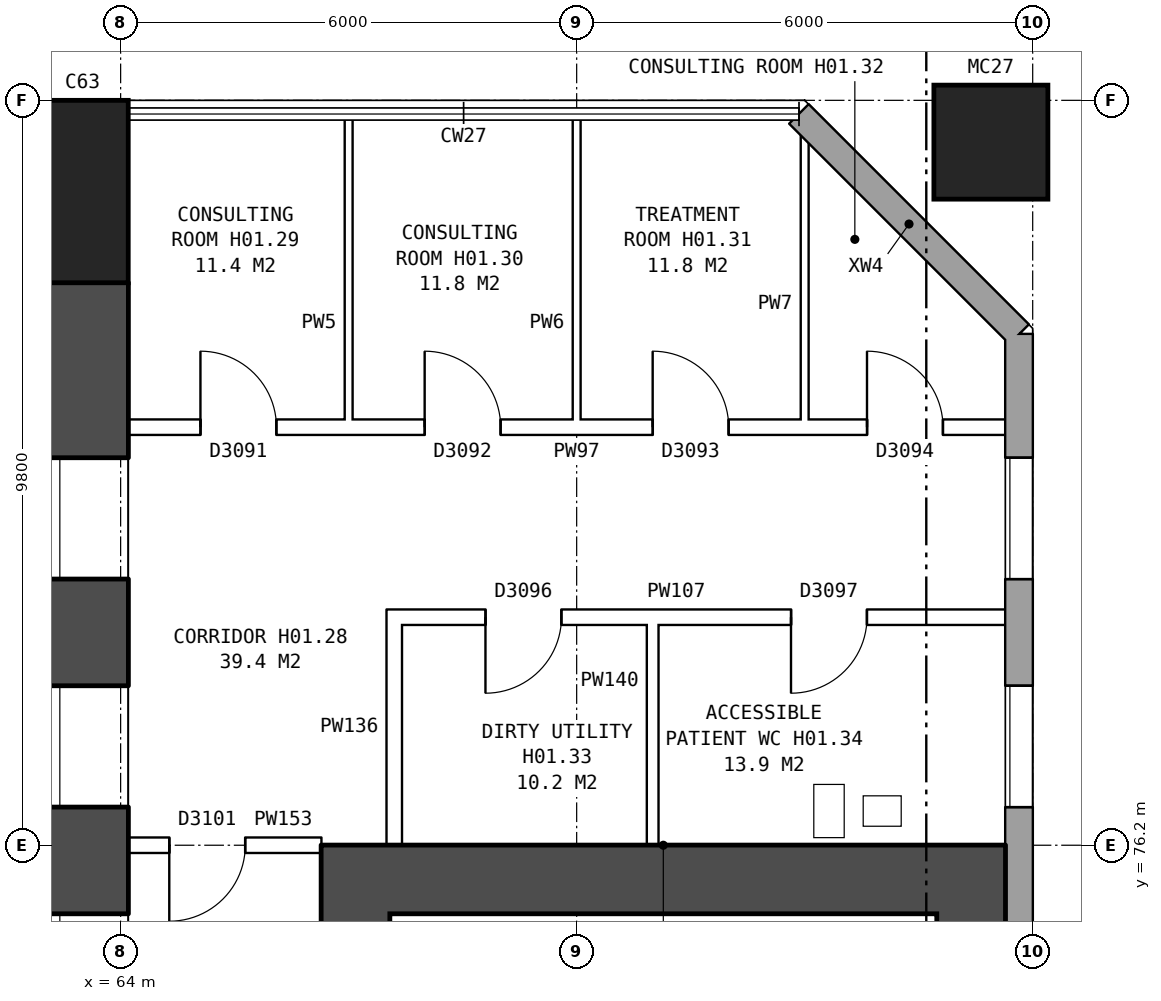
"""IFC4 building model, lengths in metres.
Left out: names, types, materials, properties, quantities, classifications, styles, units other than length and angle.
Written with IfcOpenShell. Run it as: python <this file> out.ifc"""

import sys

from ifc_helpers import new_model, si_unit, direction, frame, frame_2d, origin, origin_2d, place, context, subcontext, project, spatial, rectangle, hollow_rectangle, extrude, element, fill, save


model = new_model("IFC4")
c1 = context("Model", 3, precision=1e-05, world=origin(), true_north=direction((0.0, 1.0)))
c2 = subcontext(c1, "Body", "Model", "MODEL_VIEW")
j1 = project(units=[si_unit("LENGTHUNIT", "METRE"), si_unit("PLANEANGLEUNIT", "RADIAN")], contexts=[c1])
p1 = place(None, origin())
s1 = spatial("IfcSite", under=j1, at=p1, CompositionType="ELEMENT")
p2 = place(p1, origin())
s2 = spatial("IfcBuilding", under=s1, at=p2, CompositionType="ELEMENT")
p3 = place(p2, frame((0.0, 0.0, 5.5)))
s3 = spatial("IfcBuildingStorey", under=s2, at=p3, CompositionType="ELEMENT", Elevation=5.5)
p4 = place(p3, frame((63.5, 84.8, -0.3), z_axis=(0.0, 0.0, 1.0), x_axis=(1.0, 0.0, 0.0)))
e1 = element("IfcColumn", 1, at=p4, inside=s3, PredefinedType="COLUMN", context=c2, shape_type="SweptSolid", body=[
    extrude(rectangle(XDim=1.2, YDim=2.4, at=origin_2d()), origin(), (0.0, 0.0, 1.0), 4.6),
])
p5 = place(p3, frame((63.5, 56.4, -0.3), z_axis=(0.0, 0.0, 1.0), x_axis=(0.0, 1.0, 0.0)))
e2 = element("IfcWall", 2, at=p5, inside=s3, PredefinedType="SHEAR", context=c2, shape_type="SweptSolid", body=[
    extrude(rectangle(XDim=27.2, YDim=1.2, at=frame_2d((13.6, 0.0))), origin(), (0.0, 0.0, 1.0), 4.6),
])
p6 = place(p5, frame((2.3, 0.0, 0.8)))
e3 = element("IfcOpeningElement", 3, at=p6, cuts=e2, PredefinedType="OPENING", context=c2, shape_type="SweptSolid", body=[
    extrude(rectangle(XDim=1.6, YDim=1.8, at=frame_2d((0.8, 0.9))), frame((0.0, 0.61, 0.0), z_axis=(0.0, -1.0, 0.0), x_axis=(1.0, 0.0, 0.0)), (0.0, 0.0, 1.0), 1.22),
])
p7 = place(p5, frame((5.3, 0.0, 0.8)))
e4 = element("IfcOpeningElement", 4, at=p7, cuts=e2, PredefinedType="OPENING", context=c2, shape_type="SweptSolid", body=[
    extrude(rectangle(XDim=1.6, YDim=1.8, at=frame_2d((0.8, 0.9))), frame((0.0, 0.61, 0.0), z_axis=(0.0, -1.0, 0.0), x_axis=(1.0, 0.0, 0.0)), (0.0, 0.0, 1.0), 1.22),
])
p8 = place(p5, frame((8.3, 0.0, 0.8)))
e5 = element("IfcOpeningElement", 5, at=p8, cuts=e2, PredefinedType="OPENING", context=c2, shape_type="SweptSolid", body=[
    extrude(rectangle(XDim=1.6, YDim=1.8, at=frame_2d((0.8, 0.9))), frame((0.0, 0.61, 0.0), z_axis=(0.0, -1.0, 0.0), x_axis=(1.0, 0.0, 0.0)), (0.0, 0.0, 1.0), 1.22),
])
p9 = place(p5, frame((11.3, 0.0, 0.8)))
e6 = element("IfcOpeningElement", 6, at=p9, cuts=e2, PredefinedType="OPENING", context=c2, shape_type="SweptSolid", body=[
    extrude(rectangle(XDim=1.6, YDim=1.8, at=frame_2d((0.8, 0.9))), frame((0.0, 0.61, 0.0), z_axis=(0.0, -1.0, 0.0), x_axis=(1.0, 0.0, 0.0)), (0.0, 0.0, 1.0), 1.22),
])
p10 = place(p5, frame((14.3, 0.0, 0.8)))
e7 = element("IfcOpeningElement", 7, at=p10, cuts=e2, PredefinedType="OPENING", context=c2, shape_type="SweptSolid", body=[
    extrude(rectangle(XDim=1.6, YDim=1.8, at=frame_2d((0.8, 0.9))), frame((0.0, 0.61, 0.0), z_axis=(0.0, -1.0, 0.0), x_axis=(1.0, 0.0, 0.0)), (0.0, 0.0, 1.0), 1.22),
])
p11 = place(p5, frame((17.3, 0.0, 0.8)))
e8 = element("IfcOpeningElement", 8, at=p11, cuts=e2, PredefinedType="OPENING", context=c2, shape_type="SweptSolid", body=[
    extrude(rectangle(XDim=1.6, YDim=1.8, at=frame_2d((0.8, 0.9))), frame((0.0, 0.61, 0.0), z_axis=(0.0, -1.0, 0.0), x_axis=(1.0, 0.0, 0.0)), (0.0, 0.0, 1.0), 1.22),
])
p12 = place(p5, frame((20.3, 0.0, 0.8)))
e9 = element("IfcOpeningElement", 9, at=p12, cuts=e2, PredefinedType="OPENING", context=c2, shape_type="SweptSolid", body=[
    extrude(rectangle(XDim=1.6, YDim=1.8, at=frame_2d((0.8, 0.9))), frame((0.0, 0.61, 0.0), z_axis=(0.0, -1.0, 0.0), x_axis=(1.0, 0.0, 0.0)), (0.0, 0.0, 1.0), 1.22),
])
p13 = place(p5, frame((23.3, 0.0, 0.8)))
e10 = element("IfcOpeningElement", 10, at=p13, cuts=e2, PredefinedType="OPENING", context=c2, shape_type="SweptSolid", body=[
    extrude(rectangle(XDim=1.6, YDim=1.8, at=frame_2d((0.8, 0.9))), frame((0.0, 0.61, 0.0), z_axis=(0.0, -1.0, 0.0), x_axis=(1.0, 0.0, 0.0)), (0.0, 0.0, 1.0), 1.22),
])
p14 = place(p3, frame((75.45, 85.45, 0.0), z_axis=(0.0, 0.0, 1.0), x_axis=(1.0, 0.0, 0.0)))
e11 = element("IfcColumn", 11, at=p14, inside=s3, PredefinedType="COLUMN", context=c2, shape_type="SweptSolid", body=[
    extrude(hollow_rectangle(XDim=1.5, YDim=1.5, WallThickness=0.08, at=origin_2d()), origin(), (0.0, 0.0, 1.0), 4.6),
])
p15 = place(p3, frame((75.82, 57.075, 0.0), z_axis=(0.0, 0.0, 1.0), x_axis=(0.0, 1.0, 0.0)))
e12 = element("IfcWall", 12, at=p15, inside=s3, PredefinedType="STANDARD", context=c2, shape_type="SweptSolid", body=[
    extrude(rectangle(XDim=25.851, YDim=0.36, at=frame_2d((12.925, 0.0))), origin(), (0.0, 0.0, 1.0), 4.3),
])
p16 = place(p15, frame((1.625, 0.0, 0.8)))
e13 = element("IfcOpeningElement", 13, at=p16, cuts=e12, PredefinedType="OPENING", context=c2, shape_type="SweptSolid", body=[
    extrude(rectangle(XDim=1.6, YDim=1.8, at=frame_2d((0.8, 0.9))), frame((0.0, 0.19, 0.0), z_axis=(0.0, -1.0, 0.0), x_axis=(1.0, 0.0, 0.0)), (0.0, 0.0, 1.0), 0.38),
])
p17 = place(p15, frame((4.625, 0.0, 0.8)))
e14 = element("IfcOpeningElement", 14, at=p17, cuts=e12, PredefinedType="OPENING", context=c2, shape_type="SweptSolid", body=[
    extrude(rectangle(XDim=1.6, YDim=1.8, at=frame_2d((0.8, 0.9))), frame((0.0, 0.19, 0.0), z_axis=(0.0, -1.0, 0.0), x_axis=(1.0, 0.0, 0.0)), (0.0, 0.0, 1.0), 0.38),
])
p18 = place(p15, frame((19.625, 0.0, 0.8)))
e15 = element("IfcOpeningElement", 15, at=p18, cuts=e12, PredefinedType="OPENING", context=c2, shape_type="SweptSolid", body=[
    extrude(rectangle(XDim=1.6, YDim=1.8, at=frame_2d((0.8, 0.9))), frame((0.0, 0.19, 0.0), z_axis=(0.0, -1.0, 0.0), x_axis=(1.0, 0.0, 0.0)), (0.0, 0.0, 1.0), 0.38),
])
p19 = place(p15, frame((22.625, 0.0, 0.8)))
e16 = element("IfcOpeningElement", 16, at=p19, cuts=e12, PredefinedType="OPENING", context=c2, shape_type="SweptSolid", body=[
    extrude(rectangle(XDim=1.6, YDim=1.8, at=frame_2d((0.8, 0.9))), frame((0.0, 0.19, 0.0), z_axis=(0.0, -1.0, 0.0), x_axis=(1.0, 0.0, 0.0)), (0.0, 0.0, 1.0), 0.38),
])
p20 = place(p3, frame((75.82, 82.925, 0.0), z_axis=(0.0, 0.0, 1.0), x_axis=(-0.707106781187, 0.707106781187, 0.0)))
e17 = element("IfcWall", 17, at=p20, inside=s3, PredefinedType="STANDARD", context=c2, shape_type="SweptSolid", body=[
    extrude(rectangle(XDim=4.094, YDim=0.36, at=frame_2d((2.047, 0.0))), origin(), (0.0, 0.0, 1.0), 4.3),
])
p21 = place(p3, frame((67.09, 64.7, 0.0), z_axis=(0.0, 0.0, 1.0), x_axis=(0.0, 1.0, 0.0)))
e18 = element("IfcWall", 18, at=p21, inside=s3, PredefinedType="SHEAR", context=c2, shape_type="SweptSolid", body=[
    extrude(rectangle(XDim=10.6, YDim=0.9, at=frame_2d((5.3, 0.0))), origin(), (0.0, 0.0, 1.0), 4.3),
])
p22 = place(p21, frame((0.425, 0.0, 0.0)))
e19 = element("IfcOpeningElement", 19, at=p22, cuts=e18, PredefinedType="OPENING", context=c2, shape_type="SweptSolid", body=[
    extrude(rectangle(XDim=1.1, YDim=2.1, at=frame_2d((0.55, 1.05))), frame((0.0, 0.46, 0.0), z_axis=(0.0, -1.0, 0.0), x_axis=(1.0, 0.0, 0.0)), (0.0, 0.0, 1.0), 0.92),
])
p23 = place(p21, frame((9.0, 0.0, 0.0)))
e20 = element("IfcOpeningElement", 20, at=p23, cuts=e18, PredefinedType="OPENING", context=c2, shape_type="SweptSolid", body=[
    extrude(rectangle(XDim=1.1, YDim=2.1, at=frame_2d((0.55, 1.05))), frame((0.0, 0.46, 0.0), z_axis=(0.0, -1.0, 0.0), x_axis=(1.0, 0.0, 0.0)), (0.0, 0.0, 1.0), 0.92),
])
p24 = place(p3, frame((75.19, 64.7, 0.0), z_axis=(0.0, 0.0, 1.0), x_axis=(0.0, 1.0, 0.0)))
e21 = element("IfcWall", 21, at=p24, inside=s3, PredefinedType="SHEAR", context=c2, shape_type="SweptSolid", body=[
    extrude(rectangle(XDim=10.6, YDim=0.9, at=frame_2d((5.3, 0.0))), origin(), (0.0, 0.0, 1.0), 4.3),
])
p25 = place(p3, frame((66.64, 75.75, 0.0), z_axis=(0.0, 0.0, 1.0), x_axis=(1.0, 0.0, 0.0)))
e22 = element("IfcWall", 22, at=p25, inside=s3, PredefinedType="SHEAR", context=c2, shape_type="SweptSolid", body=[
    extrude(rectangle(XDim=9.0, YDim=0.9, at=frame_2d((4.5, 0.0))), origin(), (0.0, 0.0, 1.0), 4.3),
])
p26 = place(p3, frame((64.1, 76.2, 0.0), z_axis=(0.0, 0.0, 1.0), x_axis=(1.0, 0.0, 0.0)))
e23 = element("IfcWall", 23, at=p26, inside=s3, PredefinedType="PARTITIONING", context=c2, shape_type="SweptSolid", body=[
    extrude(rectangle(XDim=2.54, YDim=0.2, at=frame_2d((1.27, 0.0))), origin(), (0.0, 0.0, 1.0), 4.3),
])
p27 = place(p26, frame((0.54, 0.0, 0.0)))
e24 = element("IfcOpeningElement", 24, at=p27, cuts=e23, PredefinedType="OPENING", context=c2, shape_type="SweptSolid", body=[
    extrude(rectangle(XDim=1.0, YDim=2.1, at=frame_2d((0.5, 1.05))), frame((0.0, 0.11, 0.0), z_axis=(0.0, -1.0, 0.0), x_axis=(1.0, 0.0, 0.0)), (0.0, 0.0, 1.0), 0.22),
])
p28 = place(p3, frame((67.5, 79.2, 0.0), z_axis=(0.0, 0.0, 1.0), x_axis=(1.0, 0.0, 0.0)))
e25 = element("IfcWall", 25, at=p28, inside=s3, PredefinedType="PARTITIONING", context=c2, shape_type="SweptSolid", body=[
    extrude(rectangle(XDim=8.26, YDim=0.2, at=frame_2d((4.13, 0.0))), origin(), (0.0, 0.0, 1.0), 4.3),
])
p29 = place(p28, frame((1.3, 0.0, 0.0)))
e26 = element("IfcOpeningElement", 26, at=p29, cuts=e25, PredefinedType="OPENING", context=c2, shape_type="SweptSolid", body=[
    extrude(rectangle(XDim=1.0, YDim=2.1, at=frame_2d((0.5, 1.05))), frame((0.0, 0.11, 0.0), z_axis=(0.0, -1.0, 0.0), x_axis=(1.0, 0.0, 0.0)), (0.0, 0.0, 1.0), 0.22),
])
p30 = place(p28, frame((5.32, 0.0, 0.0)))
e27 = element("IfcOpeningElement", 27, at=p30, cuts=e25, PredefinedType="OPENING", context=c2, shape_type="SweptSolid", body=[
    extrude(rectangle(XDim=1.0, YDim=2.1, at=frame_2d((0.5, 1.05))), frame((0.0, 0.11, 0.0), z_axis=(0.0, -1.0, 0.0), x_axis=(1.0, 0.0, 0.0)), (0.0, 0.0, 1.0), 0.22),
])
p31 = place(p3, frame((63.98, 81.7, 0.0), z_axis=(0.0, 0.0, 1.0), x_axis=(1.0, 0.0, 0.0)))
e28 = element("IfcWall", 28, at=p31, inside=s3, PredefinedType="PARTITIONING", context=c2, shape_type="SweptSolid", body=[
    extrude(rectangle(XDim=11.78, YDim=0.2, at=frame_2d((5.89, 0.0))), origin(), (0.0, 0.0, 1.0), 4.3),
])
p32 = place(p31, frame((1.07, 0.0, 0.0)))
e29 = element("IfcOpeningElement", 29, at=p32, cuts=e28, PredefinedType="OPENING", context=c2, shape_type="SweptSolid", body=[
    extrude(rectangle(XDim=1.0, YDim=2.1, at=frame_2d((0.5, 1.05))), frame((0.0, 0.11, 0.0), z_axis=(0.0, -1.0, 0.0), x_axis=(1.0, 0.0, 0.0)), (0.0, 0.0, 1.0), 0.22),
])
p33 = place(p31, frame((4.02, 0.0, 0.0)))
e30 = element("IfcOpeningElement", 30, at=p33, cuts=e28, PredefinedType="OPENING", context=c2, shape_type="SweptSolid", body=[
    extrude(rectangle(XDim=1.0, YDim=2.1, at=frame_2d((0.5, 1.05))), frame((0.0, 0.11, 0.0), z_axis=(0.0, -1.0, 0.0), x_axis=(1.0, 0.0, 0.0)), (0.0, 0.0, 1.0), 0.22),
])
p34 = place(p31, frame((7.02, 0.0, 0.0)))
e31 = element("IfcOpeningElement", 31, at=p34, cuts=e28, PredefinedType="OPENING", context=c2, shape_type="SweptSolid", body=[
    extrude(rectangle(XDim=1.0, YDim=2.1, at=frame_2d((0.5, 1.05))), frame((0.0, 0.11, 0.0), z_axis=(0.0, -1.0, 0.0), x_axis=(1.0, 0.0, 0.0)), (0.0, 0.0, 1.0), 0.22),
])
p35 = place(p31, frame((9.84, 0.0, 0.0)))
e32 = element("IfcOpeningElement", 32, at=p35, cuts=e28, PredefinedType="OPENING", context=c2, shape_type="SweptSolid", body=[
    extrude(rectangle(XDim=1.0, YDim=2.1, at=frame_2d((0.5, 1.05))), frame((0.0, 0.11, 0.0), z_axis=(0.0, -1.0, 0.0), x_axis=(1.0, 0.0, 0.0)), (0.0, 0.0, 1.0), 0.22),
])
p36 = place(p3, frame((67.0, 81.6, 0.0), z_axis=(0.0, 0.0, 1.0), x_axis=(0.0, 1.0, 0.0)))
e33 = element("IfcWall", 33, at=p36, inside=s3, PredefinedType="PARTITIONING", context=c2, shape_type="SweptSolid", body=[
    extrude(rectangle(XDim=4.16, YDim=0.1, at=frame_2d((2.08, 0.0))), origin(), (0.0, 0.0, 1.0), 4.3),
])
p37 = place(p3, frame((67.6, 76.2, 0.0), z_axis=(0.0, 0.0, 1.0), x_axis=(0.0, 1.0, 0.0)))
e34 = element("IfcWall", 34, at=p37, inside=s3, PredefinedType="PARTITIONING", context=c2, shape_type="SweptSolid", body=[
    extrude(rectangle(XDim=3.1, YDim=0.2, at=frame_2d((1.55, 0.0))), origin(), (0.0, 0.0, 1.0), 4.3),
])
p38 = place(p3, frame((70.0, 81.6, 0.0), z_axis=(0.0, 0.0, 1.0), x_axis=(0.0, 1.0, 0.0)))
e35 = element("IfcWall", 35, at=p38, inside=s3, PredefinedType="PARTITIONING", context=c2, shape_type="SweptSolid", body=[
    extrude(rectangle(XDim=4.16, YDim=0.1, at=frame_2d((2.08, 0.0))), origin(), (0.0, 0.0, 1.0), 4.3),
])
p39 = place(p3, frame((71.0, 76.2, 0.0), z_axis=(0.0, 0.0, 1.0), x_axis=(0.0, 1.0, 0.0)))
e36 = element("IfcWall", 36, at=p39, inside=s3, PredefinedType="PLUMBINGWALL", context=c2, shape_type="SweptSolid", body=[
    extrude(rectangle(XDim=3.1, YDim=0.15, at=frame_2d((1.55, 0.0))), origin(), (0.0, 0.0, 1.0), 4.3),
])
p40 = place(p3, frame((73.0, 81.6, 0.0), z_axis=(0.0, 0.0, 1.0), x_axis=(0.0, 1.0, 0.0)))
e37 = element("IfcWall", 37, at=p40, inside=s3, PredefinedType="PARTITIONING", context=c2, shape_type="SweptSolid", body=[
    extrude(rectangle(XDim=4.011, YDim=0.1, at=frame_2d((2.005, 0.0))), origin(), (0.0, 0.0, 1.0), 4.3),
])
p41 = place(p18, origin())
e38 = element("IfcWindow", 38, at=p41, inside=s3, PartitioningType="SINGLE_PANEL", PredefinedType="WINDOW", context=c2, shape_type="SweptSolid", body=[
    extrude(rectangle(XDim=1.6, YDim=1.8, at=frame_2d((0.8, 0.9))), frame((0.0, 0.15, 0.0), z_axis=(0.0, -1.0, 0.0), x_axis=(1.0, 0.0, 0.0)), (0.0, 0.0, 1.0), 0.06),
])
fill(e15, e38)
p42 = place(p19, origin())
e39 = element("IfcWindow", 39, at=p42, inside=s3, PartitioningType="SINGLE_PANEL", PredefinedType="WINDOW", context=c2, shape_type="SweptSolid", body=[
    extrude(rectangle(XDim=1.6, YDim=1.8, at=frame_2d((0.8, 0.9))), frame((0.0, 0.15, 0.0), z_axis=(0.0, -1.0, 0.0), x_axis=(1.0, 0.0, 0.0)), (0.0, 0.0, 1.0), 0.06),
])
fill(e16, e39)
p43 = place(p11, origin())
e40 = element("IfcWindow", 40, at=p43, inside=s3, PartitioningType="SINGLE_PANEL", PredefinedType="WINDOW", context=c2, shape_type="SweptSolid", body=[
    extrude(rectangle(XDim=1.6, YDim=1.8, at=frame_2d((0.8, 0.9))), frame((0.0, 0.33, 0.0), z_axis=(0.0, -1.0, 0.0), x_axis=(1.0, 0.0, 0.0)), (0.0, 0.0, 1.0), 0.06),
])
fill(e8, e40)
p44 = place(p12, origin())
e41 = element("IfcWindow", 41, at=p44, inside=s3, PartitioningType="SINGLE_PANEL", PredefinedType="WINDOW", context=c2, shape_type="SweptSolid", body=[
    extrude(rectangle(XDim=1.6, YDim=1.8, at=frame_2d((0.8, 0.9))), frame((0.0, 0.33, 0.0), z_axis=(0.0, -1.0, 0.0), x_axis=(1.0, 0.0, 0.0)), (0.0, 0.0, 1.0), 0.06),
])
fill(e9, e41)
p45 = place(p13, origin())
e42 = element("IfcWindow", 42, at=p45, inside=s3, PartitioningType="SINGLE_PANEL", PredefinedType="WINDOW", context=c2, shape_type="SweptSolid", body=[
    extrude(rectangle(XDim=1.6, YDim=1.8, at=frame_2d((0.8, 0.9))), frame((0.0, 0.33, 0.0), z_axis=(0.0, -1.0, 0.0), x_axis=(1.0, 0.0, 0.0)), (0.0, 0.0, 1.0), 0.06),
])
fill(e10, e42)
p46 = place(p27, frame((1.0, 0.0, 0.0), z_axis=(0.0, 0.0, 1.0), x_axis=(-1.0, 0.0, 0.0)))
e43 = element("IfcDoor", 43, at=p46, inside=s3, OperationType="SINGLE_SWING_RIGHT", PredefinedType="DOOR", context=c2, shape_type="SweptSolid", body=[
    extrude(rectangle(XDim=1.0, YDim=2.1, at=frame_2d((0.5, 1.05))), frame((0.0, 0.025, 0.0), z_axis=(0.0, -1.0, 0.0), x_axis=(1.0, 0.0, 0.0)), (0.0, 0.0, 1.0), 0.05),
])
fill(e24, e43)
p47 = place(p29, frame((1.0, 0.0, 0.0), z_axis=(0.0, 0.0, 1.0), x_axis=(-1.0, 0.0, 0.0)))
e44 = element("IfcDoor", 44, at=p47, inside=s3, OperationType="SINGLE_SWING_RIGHT", PredefinedType="DOOR", context=c2, shape_type="SweptSolid", body=[
    extrude(rectangle(XDim=1.0, YDim=2.1, at=frame_2d((0.5, 1.05))), frame((0.0, 0.025, 0.0), z_axis=(0.0, -1.0, 0.0), x_axis=(1.0, 0.0, 0.0)), (0.0, 0.0, 1.0), 0.05),
])
fill(e26, e44)
p48 = place(p30, frame((1.0, 0.0, 0.0), z_axis=(0.0, 0.0, 1.0), x_axis=(-1.0, 0.0, 0.0)))
e45 = element("IfcDoor", 45, at=p48, inside=s3, OperationType="SINGLE_SWING_RIGHT", PredefinedType="DOOR", context=c2, shape_type="SweptSolid", body=[
    extrude(rectangle(XDim=1.0, YDim=2.1, at=frame_2d((0.5, 1.05))), frame((0.0, 0.025, 0.0), z_axis=(0.0, -1.0, 0.0), x_axis=(1.0, 0.0, 0.0)), (0.0, 0.0, 1.0), 0.05),
])
fill(e27, e45)
p49 = place(p32, origin())
e46 = element("IfcDoor", 46, at=p49, inside=s3, OperationType="SINGLE_SWING_LEFT", PredefinedType="DOOR", context=c2, shape_type="SweptSolid", body=[
    extrude(rectangle(XDim=1.0, YDim=2.1, at=frame_2d((0.5, 1.05))), frame((0.0, 0.025, 0.0), z_axis=(0.0, -1.0, 0.0), x_axis=(1.0, 0.0, 0.0)), (0.0, 0.0, 1.0), 0.05),
])
fill(e29, e46)
p50 = place(p33, origin())
e47 = element("IfcDoor", 47, at=p50, inside=s3, OperationType="SINGLE_SWING_LEFT", PredefinedType="DOOR", context=c2, shape_type="SweptSolid", body=[
    extrude(rectangle(XDim=1.0, YDim=2.1, at=frame_2d((0.5, 1.05))), frame((0.0, 0.025, 0.0), z_axis=(0.0, -1.0, 0.0), x_axis=(1.0, 0.0, 0.0)), (0.0, 0.0, 1.0), 0.05),
])
fill(e30, e47)
p51 = place(p34, origin())
e48 = element("IfcDoor", 48, at=p51, inside=s3, OperationType="SINGLE_SWING_LEFT", PredefinedType="DOOR", context=c2, shape_type="SweptSolid", body=[
    extrude(rectangle(XDim=1.0, YDim=2.1, at=frame_2d((0.5, 1.05))), frame((0.0, 0.025, 0.0), z_axis=(0.0, -1.0, 0.0), x_axis=(1.0, 0.0, 0.0)), (0.0, 0.0, 1.0), 0.05),
])
fill(e31, e48)
p52 = place(p35, origin())
e49 = element("IfcDoor", 49, at=p52, inside=s3, OperationType="SINGLE_SWING_LEFT", PredefinedType="DOOR", context=c2, shape_type="SweptSolid", body=[
    extrude(rectangle(XDim=1.0, YDim=2.1, at=frame_2d((0.5, 1.05))), frame((0.0, 0.025, 0.0), z_axis=(0.0, -1.0, 0.0), x_axis=(1.0, 0.0, 0.0)), (0.0, 0.0, 1.0), 0.05),
])
fill(e32, e49)
save(model, sys.argv[1])
